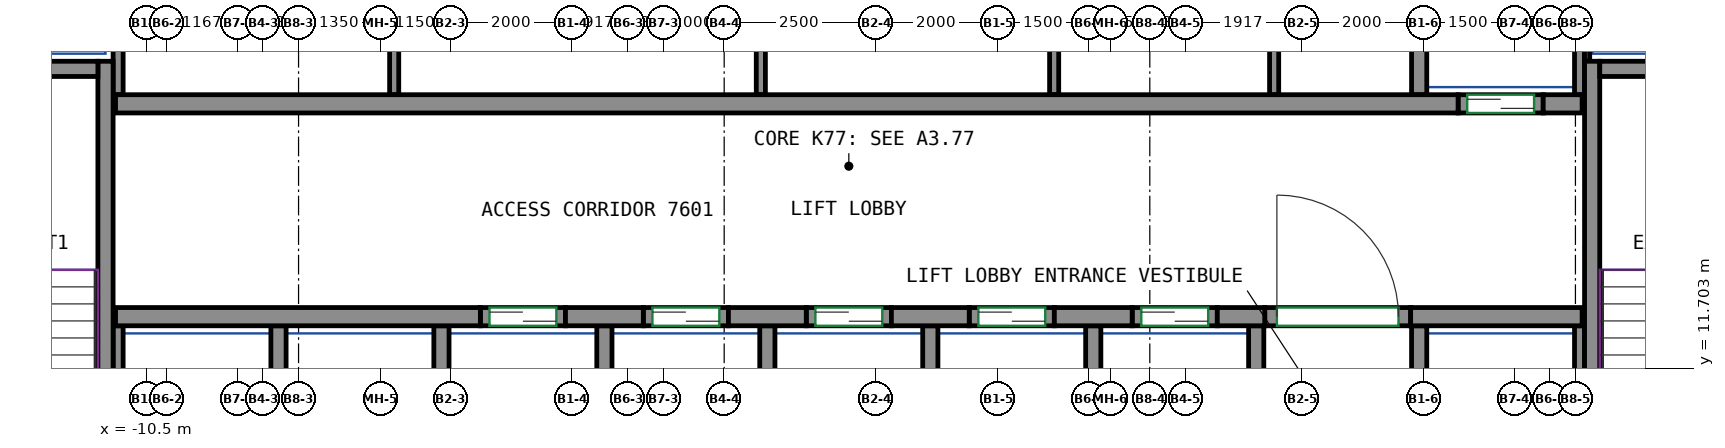
"""IFC4 building model, lengths in metres.
Left out: names, types, materials, properties, quantities, classifications, styles, units other than length and angle.
Written with IfcOpenShell. Run it as: python <this file> out.ifc"""

import sys

from ifc_helpers import new_model, si_unit, direction, frame, frame_2d, origin, place, context, subcontext, project, spatial, rectangle, extrude, source, transform, mapped, element, fill, save


model = new_model("IFC4")
c1 = context("Model", 3, precision=1e-05, world=origin(), true_north=direction((0.0, 1.0)))
c2 = subcontext(c1, "Body", "Model", "MODEL_VIEW")
j1 = project(units=[si_unit("LENGTHUNIT", "METRE"), si_unit("PLANEANGLEUNIT", "RADIAN")], contexts=[c1])
p1 = place(None, origin())
s1 = spatial("IfcSite", under=j1, at=p1, CompositionType="ELEMENT")
p2 = place(p1, origin())
s2 = spatial("IfcBuilding", under=s1, at=p2, CompositionType="ELEMENT")
p3 = place(p2, frame((0.0, 0.0, 305.2)))
s3 = spatial("IfcBuildingStorey", under=s2, at=p3, CompositionType="ELEMENT", Elevation=305.2)
m1 = source(origin(), c2, "Body", "SweptSolid", [
    extrude(rectangle(XDim=7.75, YDim=0.25, at=frame_2d((3.875, 0.0))), origin(), (0.0, 0.0, 1.0), 3.12),
])
p4 = place(p3, frame((-11.175, 9.0, 0.0), z_axis=(0.0, 0.0, 1.0), x_axis=(0.0, 1.0, 0.0)))
e1 = element("IfcWall", 1, at=p4, inside=s3, PredefinedType="SHEAR", context=c2, shape_type="MappedRepresentation", body=[
    mapped(m1, transform((0.0, 0.0, 0.0))),
])
m2 = source(origin(), c2, "Body", "SweptSolid", [
    extrude(rectangle(XDim=3.7, YDim=0.25, at=frame_2d((1.85, 0.0))), origin(), (0.0, 0.0, 1.0), 3.12),
])
p5 = place(p3, frame((-15.0, 16.625, 0.0), z_axis=(0.0, 0.0, 1.0), x_axis=(1.0, 0.0, 0.0)))
e2 = element("IfcWall", 2, at=p5, inside=s3, PredefinedType="SHEAR", context=c2, shape_type="MappedRepresentation", body=[
    mapped(m2, transform((0.0, 0.0, 0.0))),
])
p6 = place(p3, frame((13.275, 9.0, 0.0), z_axis=(0.0, 0.0, 1.0), x_axis=(0.0, 1.0, 0.0)))
e3 = element("IfcWall", 3, at=p6, inside=s3, PredefinedType="SHEAR", context=c2, shape_type="MappedRepresentation", body=[
    mapped(m1, transform((0.0, 0.0, 0.0))),
])
m3 = source(origin(), c2, "Body", "SweptSolid", [
    extrude(rectangle(XDim=3.7, YDim=0.25, at=frame_2d((1.85, 0.0))), origin(), (0.0, 0.0, 1.0), 3.12),
])
p7 = place(p3, frame((13.4, 16.625, 0.0), z_axis=(0.0, 0.0, 1.0), x_axis=(1.0, 0.0, 0.0)))
e4 = element("IfcWall", 4, at=p7, inside=s3, PredefinedType="SHEAR", context=c2, shape_type="MappedRepresentation", body=[
    mapped(m3, transform((0.0, 0.0, 0.0))),
])
m4 = source(origin(), c2, "Body", "SweptSolid", [
    extrude(rectangle(XDim=6.0, YDim=0.3, at=frame_2d((3.0, 0.0))), origin(), (0.0, 0.0, 1.0), 3.12),
])
p8 = place(p3, frame((-11.01, 12.55, 0.0), z_axis=(0.0, 0.0, 1.0), x_axis=(1.0, 0.0, 0.0)))
e5 = element("IfcWall", 5, at=p8, inside=s3, PredefinedType="SHEAR", context=c2, shape_type="MappedRepresentation", body=[
    mapped(m4, transform((0.0, 0.0, 0.0))),
])
m5 = source(origin(), c2, "Body", "SweptSolid", [
    extrude(rectangle(XDim=1.28, YDim=0.3, at=frame_2d((0.64, 0.0))), origin(), (0.0, 0.0, 1.0), 3.12),
])
for number, where, z_axis, x_axis in (
    (6, (-3.61, 12.55, 0.0), (0.0, 0.0, 1.0), (1.0, 0.0, 0.0)),
    (7, (-0.93, 12.55, 0.0), (0.0, 0.0, 1.0), (1.0, 0.0, 0.0)),
    (8, (1.75, 12.55, 0.0), (0.0, 0.0, 1.0), (1.0, 0.0, 0.0)),
    (9, (4.43, 12.55, 0.0), (0.0, 0.0, 1.0), (1.0, 0.0, 0.0)),
):
    element("IfcWall", number, at=place(p3, frame(where, z_axis=z_axis, x_axis=x_axis)), inside=s3, PredefinedType="SHEAR", context=c2, shape_type="MappedRepresentation", body=[
        mapped(m5, transform((0.0, 0.0, 0.0))),
    ])
m6 = source(origin(), c2, "Body", "SweptSolid", [
    extrude(rectangle(XDim=0.78, YDim=0.3, at=frame_2d((0.39, 0.0))), origin(), (0.0, 0.0, 1.0), 3.12),
])
p9 = place(p3, frame((7.11, 12.55, 0.0), z_axis=(0.0, 0.0, 1.0), x_axis=(1.0, 0.0, 0.0)))
e10 = element("IfcWall", 10, at=p9, inside=s3, PredefinedType="SHEAR", context=c2, shape_type="MappedRepresentation", body=[
    mapped(m6, transform((0.0, 0.0, 0.0))),
])
m7 = source(origin(), c2, "Body", "SweptSolid", [
    extrude(rectangle(XDim=2.82, YDim=0.3, at=frame_2d((1.41, 0.0))), origin(), (0.0, 0.0, 1.0), 3.12),
])
p10 = place(p3, frame((10.29, 12.55, 0.0), z_axis=(0.0, 0.0, 1.0), x_axis=(1.0, 0.0, 0.0)))
e11 = element("IfcWall", 11, at=p10, inside=s3, PredefinedType="SHEAR", context=c2, shape_type="MappedRepresentation", body=[
    mapped(m7, transform((0.0, 0.0, 0.0))),
])
m8 = source(origin(), c2, "Body", "SweptSolid", [
    extrude(rectangle(XDim=22.08, YDim=0.3, at=frame_2d((11.04, 0.0))), origin(), (0.0, 0.0, 1.0), 3.12),
])
p11 = place(p3, frame((-11.01, 16.05, 0.0), z_axis=(0.0, 0.0, 1.0), x_axis=(1.0, 0.0, 0.0)))
e12 = element("IfcWall", 12, at=p11, inside=s3, PredefinedType="SHEAR", context=c2, shape_type="MappedRepresentation", body=[
    mapped(m8, transform((0.0, 0.0, 0.0))),
])
m9 = source(origin(), c2, "Body", "SweptSolid", [
    extrude(rectangle(XDim=0.64, YDim=0.3, at=frame_2d((0.32, 0.0))), origin(), (0.0, 0.0, 1.0), 3.12),
])
p12 = place(p3, frame((12.47, 16.05, 0.0), z_axis=(0.0, 0.0, 1.0), x_axis=(1.0, 0.0, 0.0)))
e13 = element("IfcWall", 13, at=p12, inside=s3, PredefinedType="SHEAR", context=c2, shape_type="MappedRepresentation", body=[
    mapped(m9, transform((0.0, 0.0, 0.0))),
])
m10 = source(origin(), c2, "Body", "SweptSolid", [
    extrude(rectangle(XDim=1.4, YDim=0.3, at=frame_2d((0.7, 0.0))), origin(), (0.0, 0.0, 1.0), 3.12),
])
p13 = place(p3, frame((-5.01, 12.55, 0.0), z_axis=(0.0, 0.0, 1.0), x_axis=(1.0, 0.0, 0.0)))
e14 = element("IfcWall", 14, at=p13, inside=s3, PredefinedType="PARTITIONING", context=c2, shape_type="MappedRepresentation", body=[
    mapped(m10, transform((0.0, 0.0, 0.0))),
])
p14 = place(p13, frame((0.15, 0.0, 0.0)))
e15 = element("IfcOpeningElement", 15, at=p14, cuts=e14, PredefinedType="OPENING", context=c2, shape_type="SweptSolid", body=[
    extrude(rectangle(XDim=1.1, YDim=2.1, at=frame_2d((0.55, 1.05))), frame((0.0, 0.16, 0.0), z_axis=(0.0, -1.0, 0.0), x_axis=(1.0, 0.0, 0.0)), (0.0, 0.0, 1.0), 0.32),
])
m11 = source(origin(), c2, "Body", "SweptSolid", [
    extrude(rectangle(XDim=1.4, YDim=0.3, at=frame_2d((0.7, 0.0))), origin(), (0.0, 0.0, 1.0), 3.12),
])
p15 = place(p3, frame((-2.33, 12.55, 0.0), z_axis=(0.0, 0.0, 1.0), x_axis=(1.0, 0.0, 0.0)))
e16 = element("IfcWall", 16, at=p15, inside=s3, PredefinedType="PARTITIONING", context=c2, shape_type="MappedRepresentation", body=[
    mapped(m11, transform((0.0, 0.0, 0.0))),
])
p16 = place(p15, frame((0.15, 0.0, 0.0)))
e17 = element("IfcOpeningElement", 17, at=p16, cuts=e16, PredefinedType="OPENING", context=c2, shape_type="SweptSolid", body=[
    extrude(rectangle(XDim=1.1, YDim=2.1, at=frame_2d((0.55, 1.05))), frame((0.0, 0.16, 0.0), z_axis=(0.0, -1.0, 0.0), x_axis=(1.0, 0.0, 0.0)), (0.0, 0.0, 1.0), 0.32),
])
p17 = place(p3, frame((0.35, 12.55, 0.0), z_axis=(0.0, 0.0, 1.0), x_axis=(1.0, 0.0, 0.0)))
e18 = element("IfcWall", 18, at=p17, inside=s3, PredefinedType="PARTITIONING", context=c2, shape_type="MappedRepresentation", body=[
    mapped(m10, transform((0.0, 0.0, 0.0))),
])
p18 = place(p17, frame((0.15, 0.0, 0.0)))
e19 = element("IfcOpeningElement", 19, at=p18, cuts=e18, PredefinedType="OPENING", context=c2, shape_type="SweptSolid", body=[
    extrude(rectangle(XDim=1.1, YDim=2.1, at=frame_2d((0.55, 1.05))), frame((0.0, 0.16, 0.0), z_axis=(0.0, -1.0, 0.0), x_axis=(1.0, 0.0, 0.0)), (0.0, 0.0, 1.0), 0.32),
])
p19 = place(p3, frame((3.03, 12.55, 0.0), z_axis=(0.0, 0.0, 1.0), x_axis=(1.0, 0.0, 0.0)))
e20 = element("IfcWall", 20, at=p19, inside=s3, PredefinedType="PARTITIONING", context=c2, shape_type="MappedRepresentation", body=[
    mapped(m10, transform((0.0, 0.0, 0.0))),
])
p20 = place(p19, frame((0.15, 0.0, 0.0)))
e21 = element("IfcOpeningElement", 21, at=p20, cuts=e20, PredefinedType="OPENING", context=c2, shape_type="SweptSolid", body=[
    extrude(rectangle(XDim=1.1, YDim=2.1, at=frame_2d((0.55, 1.05))), frame((0.0, 0.16, 0.0), z_axis=(0.0, -1.0, 0.0), x_axis=(1.0, 0.0, 0.0)), (0.0, 0.0, 1.0), 0.32),
])
p21 = place(p3, frame((5.71, 12.55, 0.0), z_axis=(0.0, 0.0, 1.0), x_axis=(1.0, 0.0, 0.0)))
e22 = element("IfcWall", 22, at=p21, inside=s3, PredefinedType="PARTITIONING", context=c2, shape_type="MappedRepresentation", body=[
    mapped(m11, transform((0.0, 0.0, 0.0))),
])
p22 = place(p21, frame((0.15, 0.0, 0.0)))
e23 = element("IfcOpeningElement", 23, at=p22, cuts=e22, PredefinedType="OPENING", context=c2, shape_type="SweptSolid", body=[
    extrude(rectangle(XDim=1.1, YDim=2.1, at=frame_2d((0.55, 1.05))), frame((0.0, 0.16, 0.0), z_axis=(0.0, -1.0, 0.0), x_axis=(1.0, 0.0, 0.0)), (0.0, 0.0, 1.0), 0.32),
])
p23 = place(p3, frame((11.07, 16.05, 0.0), z_axis=(0.0, 0.0, 1.0), x_axis=(1.0, 0.0, 0.0)))
e24 = element("IfcWall", 24, at=p23, inside=s3, PredefinedType="PARTITIONING", context=c2, shape_type="MappedRepresentation", body=[
    mapped(m10, transform((0.0, 0.0, 0.0))),
])
p24 = place(p23, frame((0.15, 0.0, 0.0)))
e25 = element("IfcOpeningElement", 25, at=p24, cuts=e24, PredefinedType="OPENING", context=c2, shape_type="SweptSolid", body=[
    extrude(rectangle(XDim=1.1, YDim=2.1, at=frame_2d((0.55, 1.05))), frame((0.0, 0.16, 0.0), z_axis=(0.0, -1.0, 0.0), x_axis=(1.0, 0.0, 0.0)), (0.0, 0.0, 1.0), 0.32),
])
m12 = source(origin(), c2, "Body", "SweptSolid", [
    extrude(rectangle(XDim=2.4, YDim=0.3, at=frame_2d((1.2, 0.0))), origin(), (0.0, 0.0, 1.0), 3.12),
])
p25 = place(p3, frame((7.89, 12.55, 0.0), z_axis=(0.0, 0.0, 1.0), x_axis=(1.0, 0.0, 0.0)))
e26 = element("IfcWall", 26, at=p25, inside=s3, PredefinedType="PARTITIONING", context=c2, shape_type="MappedRepresentation", body=[
    mapped(m12, transform((0.0, 0.0, 0.0))),
])
p26 = place(p25, frame((0.2, 0.0, 0.0)))
e27 = element("IfcOpeningElement", 27, at=p26, cuts=e26, PredefinedType="OPENING", context=c2, shape_type="SweptSolid", body=[
    extrude(rectangle(XDim=2.0, YDim=2.1, at=frame_2d((1.0, 1.05))), frame((0.0, 0.16, 0.0), z_axis=(0.0, -1.0, 0.0), x_axis=(1.0, 0.0, 0.0)), (0.0, 0.0, 1.0), 0.32),
])
m13 = source(origin(), c2, "Body", "SweptSolid", [
    extrude(rectangle(XDim=3.275, YDim=0.165, at=frame_2d((1.638, 0.0))), origin(), (0.0, 0.0, 1.0), 3.12),
])
p27 = place(p3, frame((13.067, 16.2, 0.0), z_axis=(0.0, 0.0, 1.0), x_axis=(0.0, 1.0, 0.0)))
e28 = element("IfcWall", 28, at=p27, inside=s3, PredefinedType="PARTITIONING", context=c2, shape_type="MappedRepresentation", body=[
    mapped(m13, transform((0.0, 0.0, 0.0))),
])
m14 = source(origin(), c2, "Body", "SweptSolid", [
    extrude(rectangle(XDim=4.8, YDim=0.165, at=frame_2d((2.4, 0.0))), origin(), (0.0, 0.0, 1.0), 3.12),
])
p28 = place(p3, frame((-10.968, 16.2, 0.0), z_axis=(0.0, 0.0, 1.0), x_axis=(0.0, 1.0, 0.0)))
e29 = element("IfcWall", 29, at=p28, inside=s3, PredefinedType="PARTITIONING", context=c2, shape_type="MappedRepresentation", body=[
    mapped(m14, transform((0.0, 0.0, 0.0))),
])
m15 = source(origin(), c2, "Body", "SweptSolid", [
    extrude(rectangle(XDim=3.275, YDim=0.25, at=frame_2d((1.638, 0.0))), origin(), (0.0, 0.0, 1.0), 3.12),
])
p29 = place(p3, frame((10.43, 16.2, 0.0), z_axis=(0.0, 0.0, 1.0), x_axis=(0.0, 1.0, 0.0)))
e30 = element("IfcWall", 30, at=p29, inside=s3, PredefinedType="PARTITIONING", context=c2, shape_type="MappedRepresentation", body=[
    mapped(m15, transform((0.0, 0.0, 0.0))),
])
m16 = source(origin(), c2, "Body", "SweptSolid", [
    extrude(rectangle(XDim=2.725, YDim=0.085, at=frame_2d((1.363, 0.0))), origin(), (0.0, 0.0, 1.0), 3.12),
])
p30 = place(p3, frame((13.192, 16.75, 0.0), z_axis=(0.0, 0.0, 1.0), x_axis=(0.0, 1.0, 0.0)))
e31 = element("IfcWall", 31, at=p30, inside=s3, PredefinedType="PARTITIONING", context=c2, shape_type="MappedRepresentation", body=[
    mapped(m16, transform((0.0, 0.0, 0.0))),
])
m17 = source(origin(), c2, "Body", "SweptSolid", [
    extrude(rectangle(XDim=3.4, YDim=0.25, at=frame_2d((1.7, 0.0))), origin(), (0.0, 0.0, 1.0), 3.12),
])
p31 = place(p3, frame((10.43, 9.0, 0.0), z_axis=(0.0, 0.0, 1.0), x_axis=(0.0, 1.0, 0.0)))
e32 = element("IfcWall", 32, at=p31, inside=s3, PredefinedType="PARTITIONING", context=c2, shape_type="MappedRepresentation", body=[
    mapped(m17, transform((0.0, 0.0, 0.0))),
])
m18 = source(origin(), c2, "Body", "SweptSolid", [
    extrude(rectangle(XDim=3.4, YDim=0.165, at=frame_2d((1.7, 0.0))), origin(), (0.0, 0.0, 1.0), 3.12),
])
p32 = place(p3, frame((13.067, 9.0, 0.0), z_axis=(0.0, 0.0, 1.0), x_axis=(0.0, 1.0, 0.0)))
e33 = element("IfcWall", 33, at=p32, inside=s3, PredefinedType="PARTITIONING", context=c2, shape_type="MappedRepresentation", body=[
    mapped(m18, transform((0.0, 0.0, 0.0))),
])
for number, where, z_axis, x_axis in (
    (34, (2.39, 9.0, 0.0), (0.0, 0.0, 1.0), (0.0, 1.0, 0.0)),
    (35, (5.07, 9.0, 0.0), (0.0, 0.0, 1.0), (0.0, 1.0, 0.0)),
    (36, (7.75, 9.0, 0.0), (0.0, 0.0, 1.0), (0.0, 1.0, 0.0)),
    (37, (-0.29, 9.0, 0.0), (0.0, 0.0, 1.0), (0.0, 1.0, 0.0)),
):
    element("IfcWall", number, at=place(p3, frame(where, z_axis=z_axis, x_axis=x_axis)), inside=s3, PredefinedType="PARTITIONING", context=c2, shape_type="MappedRepresentation", body=[
        mapped(m17, transform((0.0, 0.0, 0.0))),
    ])
p33 = place(p3, frame((-10.968, 9.0, 0.0), z_axis=(0.0, 0.0, 1.0), x_axis=(0.0, 1.0, 0.0)))
e38 = element("IfcWall", 38, at=p33, inside=s3, PredefinedType="PARTITIONING", context=c2, shape_type="MappedRepresentation", body=[
    mapped(m18, transform((0.0, 0.0, 0.0))),
])
for number, where, z_axis, x_axis in (
    (39, (-2.97, 9.0, 0.0), (0.0, 0.0, 1.0), (0.0, 1.0, 0.0)),
    (40, (-5.65, 9.0, 0.0), (0.0, 0.0, 1.0), (0.0, 1.0, 0.0)),
    (41, (-8.33, 9.0, 0.0), (0.0, 0.0, 1.0), (0.0, 1.0, 0.0)),
):
    element("IfcWall", number, at=place(p3, frame(where, z_axis=z_axis, x_axis=x_axis)), inside=s3, PredefinedType="PARTITIONING", context=c2, shape_type="MappedRepresentation", body=[
        mapped(m17, transform((0.0, 0.0, 0.0))),
    ])
m19 = source(origin(), c2, "Body", "SweptSolid", [
    extrude(rectangle(XDim=4.8, YDim=0.15, at=frame_2d((2.4, 0.0))), origin(), (0.0, 0.0, 1.0), 3.12),
])
for number, where, z_axis, x_axis in (
    (42, (-6.427, 16.2, 0.0), (0.0, 0.0, 1.0), (0.0, 1.0, 0.0)),
    (43, (-0.397, 16.2, 0.0), (0.0, 0.0, 1.0), (0.0, 1.0, 0.0)),
    (44, (4.427, 16.2, 0.0), (0.0, 0.0, 1.0), (0.0, 1.0, 0.0)),
    (45, (8.045, 16.2, 0.0), (0.0, 0.0, 1.0), (0.0, 1.0, 0.0)),
):
    element("IfcWall", number, at=place(p3, frame(where, z_axis=z_axis, x_axis=x_axis)), inside=s3, PredefinedType="PARTITIONING", context=c2, shape_type="MappedRepresentation", body=[
        mapped(m19, transform((0.0, 0.0, 0.0))),
    ])
p34 = place(p26, origin())
e46 = element("IfcDoor", 46, at=p34, inside=s3, OperationType="DOUBLE_DOOR_SINGLE_SWING", PredefinedType="DOOR", context=c2, shape_type="SweptSolid", body=[
    extrude(rectangle(XDim=2.0, YDim=2.1, at=frame_2d((1.0, 1.05))), frame((0.0, 0.025, 0.0), z_axis=(0.0, -1.0, 0.0), x_axis=(1.0, 0.0, 0.0)), (0.0, 0.0, 1.0), 0.05),
])
fill(e27, e46)
p35 = place(p14, origin())
e47 = element("IfcDoor", 47, at=p35, inside=s3, OperationType="DOUBLE_DOOR_SLIDING", PredefinedType="DOOR", context=c2, shape_type="SweptSolid", body=[
    extrude(rectangle(XDim=1.1, YDim=2.1, at=frame_2d((0.55, 1.05))), frame((0.0, 0.025, 0.0), z_axis=(0.0, -1.0, 0.0), x_axis=(1.0, 0.0, 0.0)), (0.0, 0.0, 1.0), 0.05),
])
fill(e15, e47)
p36 = place(p16, origin())
e48 = element("IfcDoor", 48, at=p36, inside=s3, OperationType="DOUBLE_DOOR_SLIDING", PredefinedType="DOOR", context=c2, shape_type="SweptSolid", body=[
    extrude(rectangle(XDim=1.1, YDim=2.1, at=frame_2d((0.55, 1.05))), frame((0.0, 0.025, 0.0), z_axis=(0.0, -1.0, 0.0), x_axis=(1.0, 0.0, 0.0)), (0.0, 0.0, 1.0), 0.05),
])
fill(e17, e48)
p37 = place(p18, origin())
e49 = element("IfcDoor", 49, at=p37, inside=s3, OperationType="DOUBLE_DOOR_SLIDING", PredefinedType="DOOR", context=c2, shape_type="SweptSolid", body=[
    extrude(rectangle(XDim=1.1, YDim=2.1, at=frame_2d((0.55, 1.05))), frame((0.0, 0.025, 0.0), z_axis=(0.0, -1.0, 0.0), x_axis=(1.0, 0.0, 0.0)), (0.0, 0.0, 1.0), 0.05),
])
fill(e19, e49)
p38 = place(p20, origin())
e50 = element("IfcDoor", 50, at=p38, inside=s3, OperationType="DOUBLE_DOOR_SLIDING", PredefinedType="DOOR", context=c2, shape_type="SweptSolid", body=[
    extrude(rectangle(XDim=1.1, YDim=2.1, at=frame_2d((0.55, 1.05))), frame((0.0, 0.025, 0.0), z_axis=(0.0, -1.0, 0.0), x_axis=(1.0, 0.0, 0.0)), (0.0, 0.0, 1.0), 0.05),
])
fill(e21, e50)
p39 = place(p22, origin())
e51 = element("IfcDoor", 51, at=p39, inside=s3, OperationType="DOUBLE_DOOR_SLIDING", PredefinedType="DOOR", context=c2, shape_type="SweptSolid", body=[
    extrude(rectangle(XDim=1.1, YDim=2.1, at=frame_2d((0.55, 1.05))), frame((0.0, 0.025, 0.0), z_axis=(0.0, -1.0, 0.0), x_axis=(1.0, 0.0, 0.0)), (0.0, 0.0, 1.0), 0.05),
])
fill(e23, e51)
p40 = place(p24, origin())
e52 = element("IfcDoor", 52, at=p40, inside=s3, OperationType="DOUBLE_DOOR_SLIDING", PredefinedType="DOOR", context=c2, shape_type="SweptSolid", body=[
    extrude(rectangle(XDim=1.1, YDim=2.1, at=frame_2d((0.55, 1.05))), frame((0.0, 0.025, 0.0), z_axis=(0.0, -1.0, 0.0), x_axis=(1.0, 0.0, 0.0)), (0.0, 0.0, 1.0), 0.05),
])
fill(e25, e52)
save(model, sys.argv[1])
